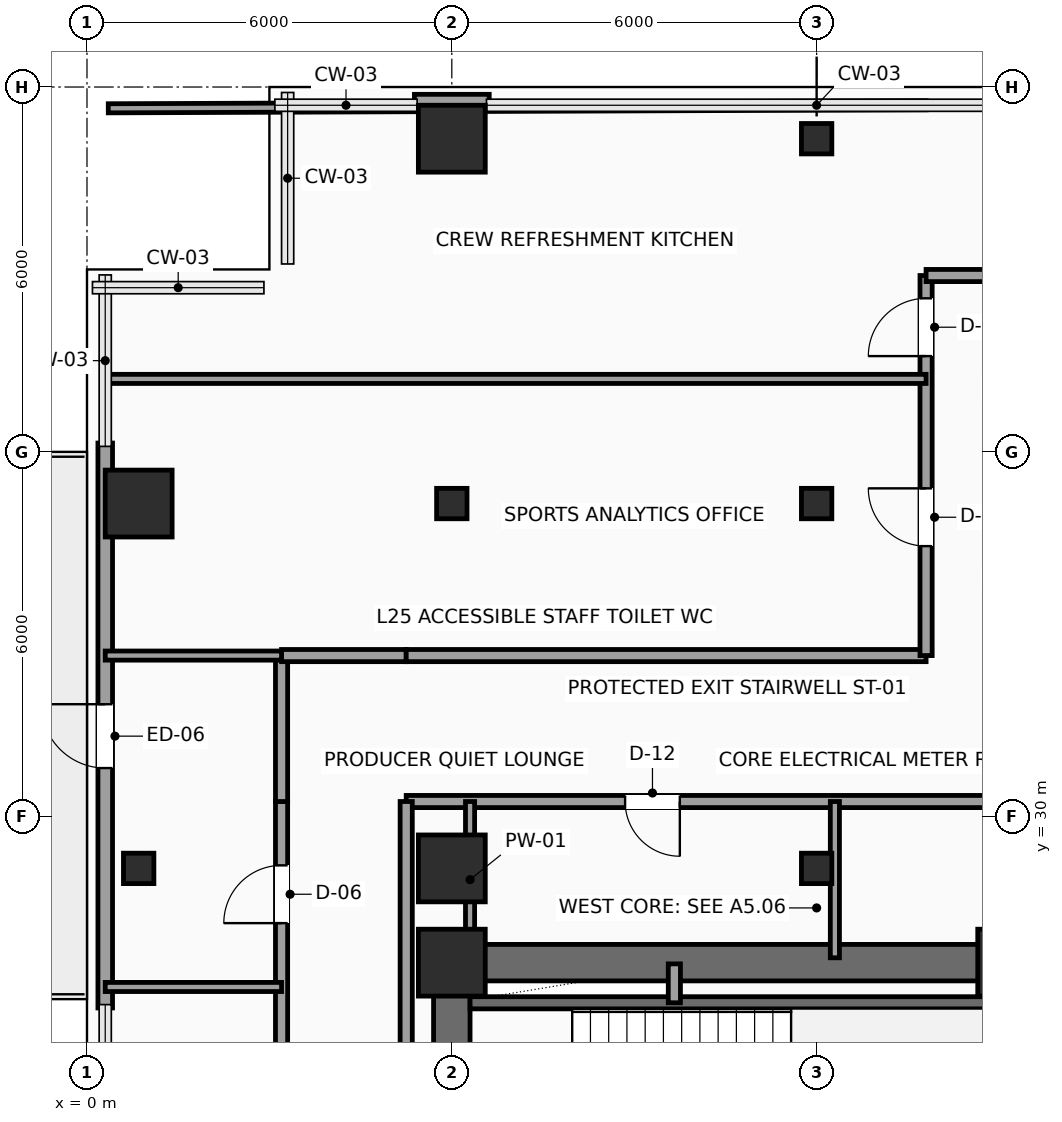
"""IFC4 building model, lengths in metres.
Left out: names, types, materials, properties, quantities, classifications, styles, units other than length and angle.
Written with IfcOpenShell. Run it as: python <this file> out.ifc"""

import sys

from ifc_helpers import new_model, si_unit, direction, frame, frame_2d, origin, origin_2d, place, context, subcontext, project, spatial, rectangle, hollow_rectangle, extrude, element, fill, save


model = new_model("IFC4")
c1 = context("Model", 3, precision=1e-05, world=origin(), true_north=direction((0.0, 1.0)))
c2 = subcontext(c1, "Body", "Model", "MODEL_VIEW")
j1 = project(units=[si_unit("LENGTHUNIT", "METRE"), si_unit("PLANEANGLEUNIT", "RADIAN")], contexts=[c1])
p1 = place(None, origin())
s1 = spatial("IfcSite", under=j1, at=p1, CompositionType="ELEMENT")
p2 = place(p1, origin())
s2 = spatial("IfcBuilding", under=s1, at=p2, CompositionType="ELEMENT")
p3 = place(p2, frame((0.0, 0.0, 107.1)))
s3 = spatial("IfcBuildingStorey", under=s2, at=p3, CompositionType="ELEMENT", Elevation=107.1)
for number, where, z_axis, x_axis in (
    (1, (6.0, 27.6, 0.0), (0.0, 0.0, 1.0), (1.0, 0.0, 0.0)),
    (2, (15.2, 27.6, 0.0), (0.0, 0.0, 1.0), (1.0, 0.0, 0.0)),
):
    element("IfcColumn", number, at=place(p3, frame(where, z_axis=z_axis, x_axis=x_axis)), inside=s3, PredefinedType="COLUMN", context=c2, shape_type="SweptSolid", body=[
        extrude(rectangle(XDim=1.1, YDim=1.1, at=origin_2d()), origin(), (0.0, 0.0, 1.0), 3.75),
    ])
p4 = place(p3, frame((0.85, 29.15, 0.0), z_axis=(0.0, 0.0, 1.0), x_axis=(1.0, 0.0, 0.0)))
e3 = element("IfcColumn", 3, at=p4, inside=s3, PredefinedType="COLUMN", context=c2, shape_type="SweptSolid", body=[
    extrude(hollow_rectangle(XDim=0.5, YDim=0.5, WallThickness=0.025, InnerFilletRadius=0.025, OuterFilletRadius=0.04, at=origin_2d()), origin(), (0.0, 0.0, 1.0), 3.75),
])
for number, where, z_axis, x_axis in (
    (4, (0.85, 35.15, 0.0), (0.0, 0.0, 1.0), (1.0, 0.0, 0.0)),
    (5, (6.0, 29.15, 0.0), (0.0, 0.0, 1.0), (1.0, 0.0, 0.0)),
):
    element("IfcColumn", number, at=place(p3, frame(where, z_axis=z_axis, x_axis=x_axis)), inside=s3, PredefinedType="COLUMN", context=c2, shape_type="SweptSolid", body=[
        extrude(rectangle(XDim=1.1, YDim=1.1, at=origin_2d()), origin(), (0.0, 0.0, 1.0), 3.75),
    ])
p5 = place(p3, frame((6.0, 35.15, 0.0), z_axis=(0.0, 0.0, 1.0), x_axis=(1.0, 0.0, 0.0)))
e6 = element("IfcColumn", 6, at=p5, inside=s3, PredefinedType="COLUMN", context=c2, shape_type="SweptSolid", body=[
    extrude(hollow_rectangle(XDim=0.5, YDim=0.5, WallThickness=0.025, InnerFilletRadius=0.025, OuterFilletRadius=0.04, at=origin_2d()), origin(), (0.0, 0.0, 1.0), 3.75),
])
p6 = place(p3, frame((6.0, 41.15, 0.0), z_axis=(0.0, 0.0, 1.0), x_axis=(1.0, 0.0, 0.0)))
e7 = element("IfcColumn", 7, at=p6, inside=s3, PredefinedType="COLUMN", context=c2, shape_type="SweptSolid", body=[
    extrude(rectangle(XDim=1.1, YDim=1.1, at=origin_2d()), origin(), (0.0, 0.0, 1.0), 3.75),
])
for number, where, z_axis, x_axis in (
    (8, (12.0, 29.15, 0.0), (0.0, 0.0, 1.0), (1.0, 0.0, 0.0)),
    (9, (12.0, 35.15, 0.0), (0.0, 0.0, 1.0), (1.0, 0.0, 0.0)),
    (10, (12.0, 41.15, 0.0), (0.0, 0.0, 1.0), (1.0, 0.0, 0.0)),
):
    element("IfcColumn", number, at=place(p3, frame(where, z_axis=z_axis, x_axis=x_axis)), inside=s3, PredefinedType="COLUMN", context=c2, shape_type="SweptSolid", body=[
        extrude(hollow_rectangle(XDim=0.5, YDim=0.5, WallThickness=0.025, InnerFilletRadius=0.025, OuterFilletRadius=0.04, at=origin_2d()), origin(), (0.0, 0.0, 1.0), 3.75),
    ])
p7 = place(p3, frame((0.3, 26.855, 0.0), z_axis=(0.0, 0.0, 1.0), x_axis=(0.0, 1.0, 0.0)))
e11 = element("IfcWall", 11, at=p7, inside=s3, PredefinedType="SOLIDWALL", context=c2, shape_type="SweptSolid", body=[
    extrude(rectangle(XDim=9.29, YDim=0.24, at=frame_2d((4.645, 0.0))), origin(), (0.0, 0.0, 1.0), 3.475),
])
p8 = place(p7, frame((3.945, 0.0, 0.0)))
e12 = element("IfcOpeningElement", 12, at=p8, cuts=e11, PredefinedType="OPENING", context=c2, shape_type="SweptSolid", body=[
    extrude(rectangle(XDim=1.05, YDim=2.2, at=frame_2d((0.525, 1.1))), frame((0.0, 0.13, 0.0), z_axis=(0.0, -1.0, 0.0), x_axis=(1.0, 0.0, 0.0)), (0.0, 0.0, 1.0), 0.26),
])
p9 = place(p3, frame((5.385, 41.76, 0.0), z_axis=(0.0, 0.0, 1.0), x_axis=(1.0, 0.0, 0.0)))
e13 = element("IfcWall", 13, at=p9, inside=s3, PredefinedType="SOLIDWALL", context=c2, shape_type="SweptSolid", body=[
    extrude(rectangle(XDim=1.23, YDim=0.24, at=frame_2d((0.615, 0.0))), origin(), (0.0, 0.0, 1.0), 3.475),
])
p10 = place(p3, frame((6.0, 27.6, 0.0), z_axis=(0.0, 0.0, 1.0), x_axis=(1.0, 0.0, 0.0)))
e14 = element("IfcWall", 14, at=p10, inside=s3, PredefinedType="SHEAR", context=c2, shape_type="SweptSolid", body=[
    extrude(rectangle(XDim=12.0, YDim=0.6, at=frame_2d((6.0, 0.0))), origin(), (0.0, 0.0, 1.0), 3.475),
])
p11 = place(p10, frame((10.2, 0.0, 0.0)))
e15 = element("IfcOpeningElement", 15, at=p11, cuts=e14, PredefinedType="OPENING", context=c2, shape_type="SweptSolid", body=[
    extrude(rectangle(XDim=0.9, YDim=2.15, at=frame_2d((0.45, 1.075))), frame((0.0, 0.31, 0.0), z_axis=(0.0, -1.0, 0.0), x_axis=(1.0, 0.0, 0.0)), (0.0, 0.0, 1.0), 0.62),
])
p12 = place(p3, frame((6.0, 18.0, 0.0), z_axis=(0.0, 0.0, 1.0), x_axis=(0.0, 1.0, 0.0)))
e16 = element("IfcWall", 16, at=p12, inside=s3, PredefinedType="SHEAR", context=c2, shape_type="SweptSolid", body=[
    extrude(rectangle(XDim=9.6, YDim=0.6, at=frame_2d((4.8, 0.0))), origin(), (0.0, 0.0, 1.0), 3.475),
])
p13 = place(p3, frame((6.3, 26.94, 0.0), z_axis=(0.0, 0.0, 1.0), x_axis=(1.0, 0.0, 0.0)))
e17 = element("IfcWall", 17, at=p13, inside=s3, PredefinedType="SHEAR", context=c2, shape_type="SweptSolid", body=[
    extrude(rectangle(XDim=8.88, YDim=0.2, at=frame_2d((4.44, 0.0))), origin(), (0.0, 0.0, 1.0), 3.475),
])
p14 = place(p3, frame((9.66, 26.94, 0.0), z_axis=(0.0, 0.0, 1.0), x_axis=(0.0, 1.0, 0.0)))
e18 = element("IfcWall", 18, at=p14, inside=s3, PredefinedType="SOLIDWALL", context=c2, shape_type="SweptSolid", body=[
    extrude(rectangle(XDim=0.64, YDim=0.2, at=frame_2d((0.32, 0.0))), origin(), (0.0, 0.0, 1.0), 3.475),
])
p15 = place(p3, frame((3.2, 14.8, 0.0), z_axis=(0.0, 0.0, 1.0), x_axis=(0.0, 1.0, 0.0)))
e19 = element("IfcWall", 19, at=p15, inside=s3, PredefinedType="PARTITIONING", context=c2, shape_type="SweptSolid", body=[
    extrude(rectangle(XDim=15.45, YDim=0.2, at=frame_2d((7.725, 0.0))), origin(), (0.0, 0.0, 1.0), 3.475),
])
p16 = place(p15, frame((2.625, 0.0, 0.0)))
e20 = element("IfcOpeningElement", 20, at=p16, cuts=e19, PredefinedType="OPENING", context=c2, shape_type="SweptSolid", body=[
    extrude(rectangle(XDim=0.95, YDim=2.15, at=frame_2d((0.475, 1.075))), frame((0.0, 0.11, 0.0), z_axis=(0.0, -1.0, 0.0), x_axis=(1.0, 0.0, 0.0)), (0.0, 0.0, 1.0), 0.22),
])
p17 = place(p15, frame((8.825, 0.0, 0.0)))
e21 = element("IfcOpeningElement", 21, at=p17, cuts=e19, PredefinedType="OPENING", context=c2, shape_type="SweptSolid", body=[
    extrude(rectangle(XDim=0.95, YDim=2.15, at=frame_2d((0.475, 1.075))), frame((0.0, 0.11, 0.0), z_axis=(0.0, -1.0, 0.0), x_axis=(1.0, 0.0, 0.0)), (0.0, 0.0, 1.0), 0.22),
])
p18 = place(p15, frame((13.45, 0.0, 0.0)))
e22 = element("IfcOpeningElement", 22, at=p18, cuts=e19, PredefinedType="OPENING", context=c2, shape_type="SweptSolid", body=[
    extrude(rectangle(XDim=0.95, YDim=2.15, at=frame_2d((0.475, 1.075))), frame((0.0, 0.11, 0.0), z_axis=(0.0, -1.0, 0.0), x_axis=(1.0, 0.0, 0.0)), (0.0, 0.0, 1.0), 0.22),
])
p19 = place(p3, frame((3.2, 30.25, 0.0), z_axis=(0.0, 0.0, 1.0), x_axis=(0.0, 1.0, 0.0)))
e23 = element("IfcWall", 23, at=p19, inside=s3, PredefinedType="PARTITIONING", context=c2, shape_type="SweptSolid", body=[
    extrude(rectangle(XDim=2.4, YDim=0.2, at=frame_2d((1.2, 0.0))), origin(), (0.0, 0.0, 1.0), 3.475),
])
p20 = place(p3, frame((3.2, 32.65, 0.0), z_axis=(0.0, 0.0, 1.0), x_axis=(1.0, 0.0, 0.0)))
e24 = element("IfcWall", 24, at=p20, inside=s3, PredefinedType="PARTITIONING", context=c2, shape_type="SweptSolid", body=[
    extrude(rectangle(XDim=2.05, YDim=0.2, at=frame_2d((1.025, 0.0))), origin(), (0.0, 0.0, 1.0), 3.475),
])
p21 = place(p3, frame((5.25, 32.65, 0.0), z_axis=(0.0, 0.0, 1.0), x_axis=(1.0, 0.0, 0.0)))
e25 = element("IfcWall", 25, at=p21, inside=s3, PredefinedType="PARTITIONING", context=c2, shape_type="SweptSolid", body=[
    extrude(rectangle(XDim=8.55, YDim=0.2, at=frame_2d((4.275, 0.0))), origin(), (0.0, 0.0, 1.0), 3.475),
])
p22 = place(p3, frame((13.8, 32.65, 0.0), z_axis=(0.0, 0.0, 1.0), x_axis=(0.0, 1.0, 0.0)))
e26 = element("IfcWall", 26, at=p22, inside=s3, PredefinedType="PARTITIONING", context=c2, shape_type="SweptSolid", body=[
    extrude(rectangle(XDim=6.25, YDim=0.2, at=frame_2d((3.125, 0.0))), origin(), (0.0, 0.0, 1.0), 3.475),
])
p23 = place(p22, frame((1.8, 0.0, 0.0)))
e27 = element("IfcOpeningElement", 27, at=p23, cuts=e26, PredefinedType="OPENING", context=c2, shape_type="SweptSolid", body=[
    extrude(rectangle(XDim=0.95, YDim=2.15, at=frame_2d((0.475, 1.075))), frame((0.0, 0.11, 0.0), z_axis=(0.0, -1.0, 0.0), x_axis=(1.0, 0.0, 0.0)), (0.0, 0.0, 1.0), 0.22),
])
p24 = place(p22, frame((4.925, 0.0, 0.0)))
e28 = element("IfcOpeningElement", 28, at=p24, cuts=e26, PredefinedType="OPENING", context=c2, shape_type="SweptSolid", body=[
    extrude(rectangle(XDim=0.95, YDim=2.15, at=frame_2d((0.475, 1.075))), frame((0.0, 0.11, 0.0), z_axis=(0.0, -1.0, 0.0), x_axis=(1.0, 0.0, 0.0)), (0.0, 0.0, 1.0), 0.22),
])
p25 = place(p3, frame((13.8, 38.9, 0.0), z_axis=(0.0, 0.0, 1.0), x_axis=(1.0, 0.0, 0.0)))
e29 = element("IfcWall", 29, at=p25, inside=s3, PredefinedType="PARTITIONING", context=c2, shape_type="SweptSolid", body=[
    extrude(rectangle(XDim=2.35, YDim=0.2, at=frame_2d((1.175, 0.0))), origin(), (0.0, 0.0, 1.0), 3.475),
])
p26 = place(p3, frame((15.88, 30.25, 0.0), z_axis=(0.0, 0.0, 1.0), x_axis=(-1.0, 0.0, 0.0)))
e30 = element("IfcWall", 30, at=p26, inside=s3, PredefinedType="PARTITIONING", context=c2, shape_type="SweptSolid", body=[
    extrude(rectangle(XDim=10.63, YDim=0.2, at=frame_2d((5.315, 0.0))), origin(), (0.0, 0.0, 1.0), 3.475),
])
p27 = place(p26, frame((6.13, 0.0, 0.0)))
e31 = element("IfcOpeningElement", 31, at=p27, cuts=e30, PredefinedType="OPENING", context=c2, shape_type="SweptSolid", body=[
    extrude(rectangle(XDim=0.9, YDim=2.1, at=frame_2d((0.45, 1.05))), frame((0.0, 0.11, 0.0), z_axis=(0.0, -1.0, 0.0), x_axis=(1.0, 0.0, 0.0)), (0.0, 0.0, 1.0), 0.22),
])
p28 = place(p3, frame((5.25, 30.25, 0.0), z_axis=(0.0, 0.0, 1.0), x_axis=(0.0, -1.0, 0.0)))
e32 = element("IfcWall", 32, at=p28, inside=s3, PredefinedType="PARTITIONING", context=c2, shape_type="SweptSolid", body=[
    extrude(rectangle(XDim=13.1, YDim=0.2, at=frame_2d((6.55, 0.0))), origin(), (0.0, 0.0, 1.0), 3.475),
])
for number, where, z_axis, x_axis in (
    (33, (6.3, 27.68, 0.0), (0.0, 0.0, 1.0), (0.0, 1.0, 0.0)),
    (34, (12.3, 27.68, 0.0), (0.0, 0.0, 1.0), (0.0, 1.0, 0.0)),
):
    element("IfcWall", number, at=place(p3, frame(where, z_axis=z_axis, x_axis=x_axis)), inside=s3, PredefinedType="PARTITIONING", context=c2, shape_type="SweptSolid", body=[
        extrude(rectangle(XDim=2.57, YDim=0.15, at=frame_2d((1.285, 0.0))), origin(), (0.0, 0.0, 1.0), 2.967),
    ])
p29 = place(p3, frame((0.3, 37.2, 0.0), z_axis=(0.0, 0.0, 1.0), x_axis=(1.0, 0.0, 0.0)))
e35 = element("IfcWall", 35, at=p29, inside=s3, PredefinedType="PARTITIONING", context=c2, shape_type="SweptSolid", body=[
    extrude(rectangle(XDim=13.5, YDim=0.15, at=frame_2d((6.75, 0.0))), origin(), (0.0, 0.0, 1.0), 3.475),
])
p30 = place(p3, frame((0.35, 41.65, 0.0), z_axis=(0.0, 0.0, 1.0), x_axis=(0.999993029832, 0.003733669364, 0.0)))
e36 = element("IfcWall", 36, at=p30, inside=s3, PredefinedType="PARTITIONING", context=c2, shape_type="SweptSolid", body=[
    extrude(rectangle(XDim=5.035, YDim=0.15, at=frame_2d((2.518, 0.0))), origin(), (0.0, 0.0, 1.0), 3.475),
])
p31 = place(p3, frame((6.615, 41.673, 0.0), z_axis=(0.0, 0.0, 1.0), x_axis=(0.99999314136, 0.003703678301, 0.0)))
e37 = element("IfcWall", 37, at=p31, inside=s3, PredefinedType="PARTITIONING", context=c2, shape_type="SweptSolid", body=[
    extrude(rectangle(XDim=7.185, YDim=0.15, at=frame_2d((3.593, 0.0))), origin(), (0.0, 0.0, 1.0), 3.475),
])
for number, where, z_axis, x_axis in (
    (38, (0.3, 27.2, 0.0), (0.0, 0.0, 1.0), (1.0, 0.0, 0.0)),
    (39, (0.3, 32.65, 0.0), (0.0, 0.0, 1.0), (1.0, 0.0, 0.0)),
):
    element("IfcWall", number, at=place(p3, frame(where, z_axis=z_axis, x_axis=x_axis)), inside=s3, PredefinedType="PARTITIONING", context=c2, shape_type="SweptSolid", body=[
        extrude(rectangle(XDim=2.9, YDim=0.15, at=frame_2d((1.45, 0.0))), origin(), (0.0, 0.0, 1.0), 3.475),
    ])
p32 = place(p8, origin())
e40 = element("IfcDoor", 40, at=p32, inside=s3, OperationType="SINGLE_SWING_RIGHT", PredefinedType="DOOR", context=c2, shape_type="SweptSolid", body=[
    extrude(rectangle(XDim=1.05, YDim=2.2, at=frame_2d((0.525, 1.1))), frame((0.0, 0.025, 0.0), z_axis=(0.0, -1.0, 0.0), x_axis=(1.0, 0.0, 0.0)), (0.0, 0.0, 1.0), 0.05),
])
fill(e12, e40)
p33 = place(p18, origin())
e41 = element("IfcDoor", 41, at=p33, inside=s3, OperationType="SINGLE_SWING_LEFT", PredefinedType="DOOR", context=c2, shape_type="SweptSolid", body=[
    extrude(rectangle(XDim=0.95, YDim=2.15, at=frame_2d((0.475, 1.075))), frame((0.0, 0.025, 0.0), z_axis=(0.0, -1.0, 0.0), x_axis=(1.0, 0.0, 0.0)), (0.0, 0.0, 1.0), 0.05),
])
fill(e22, e41)
p34 = place(p23, origin())
e42 = element("IfcDoor", 42, at=p34, inside=s3, OperationType="SINGLE_SWING_RIGHT", PredefinedType="DOOR", context=c2, shape_type="SweptSolid", body=[
    extrude(rectangle(XDim=0.95, YDim=2.15, at=frame_2d((0.475, 1.075))), frame((0.0, 0.025, 0.0), z_axis=(0.0, -1.0, 0.0), x_axis=(1.0, 0.0, 0.0)), (0.0, 0.0, 1.0), 0.05),
])
fill(e27, e42)
p35 = place(p24, origin())
e43 = element("IfcDoor", 43, at=p35, inside=s3, OperationType="SINGLE_SWING_LEFT", PredefinedType="DOOR", context=c2, shape_type="SweptSolid", body=[
    extrude(rectangle(XDim=0.95, YDim=2.15, at=frame_2d((0.475, 1.075))), frame((0.0, 0.025, 0.0), z_axis=(0.0, -1.0, 0.0), x_axis=(1.0, 0.0, 0.0)), (0.0, 0.0, 1.0), 0.05),
])
fill(e28, e43)
p36 = place(p27, origin())
e44 = element("IfcDoor", 44, at=p36, inside=s3, OperationType="SINGLE_SWING_LEFT", PredefinedType="DOOR", context=c2, shape_type="SweptSolid", body=[
    extrude(rectangle(XDim=0.9, YDim=2.1, at=frame_2d((0.45, 1.05))), frame((0.0, 0.025, 0.0), z_axis=(0.0, -1.0, 0.0), x_axis=(1.0, 0.0, 0.0)), (0.0, 0.0, 1.0), 0.05),
])
fill(e31, e44)
save(model, sys.argv[1])
